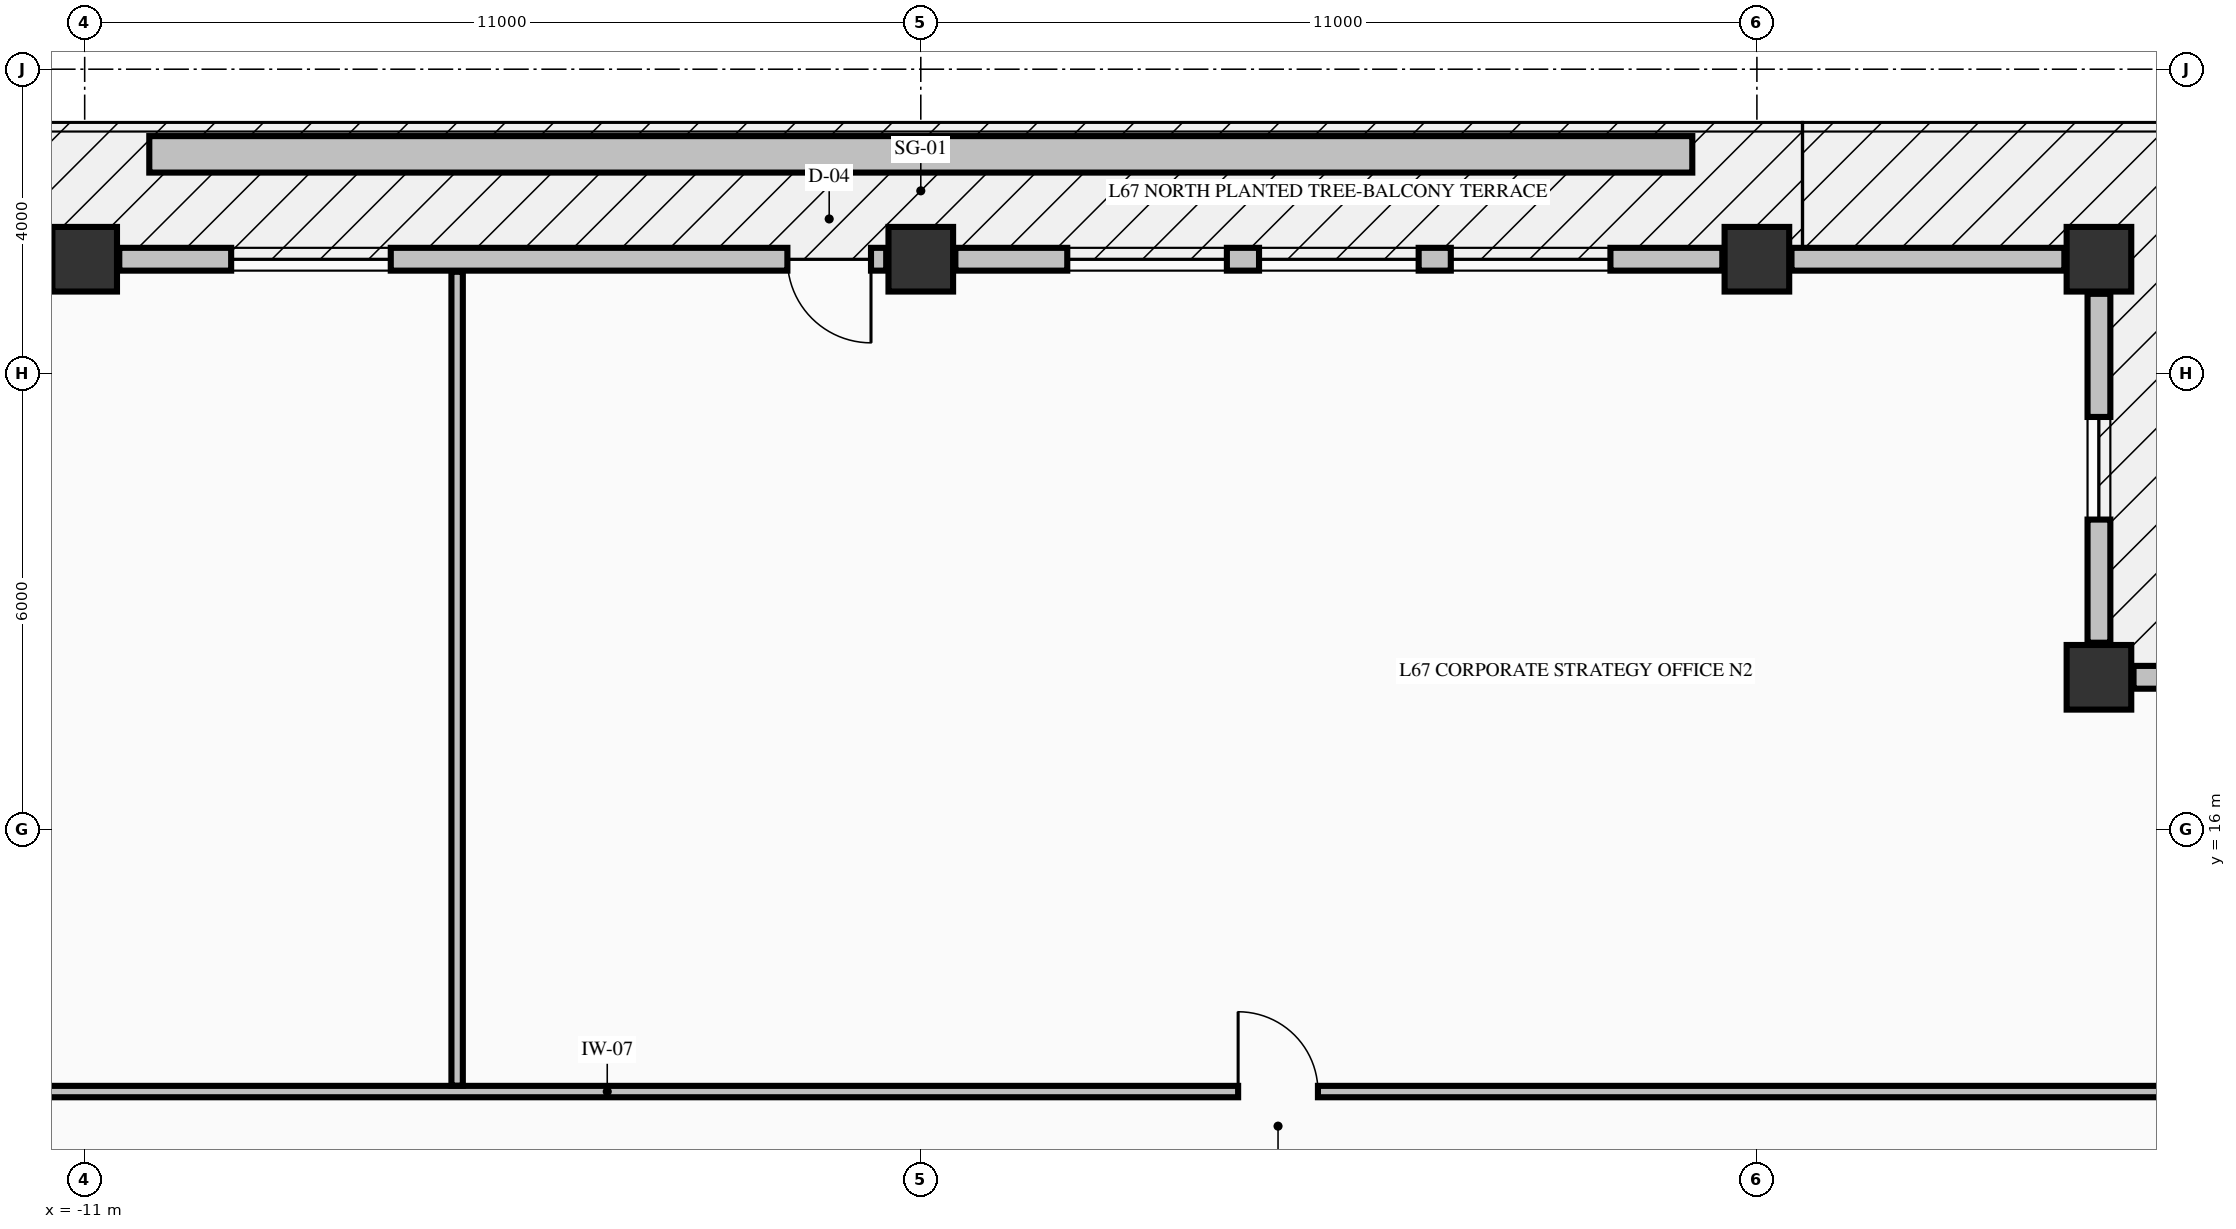
"""IFC4 building model, lengths in metres.
Left out: names, types, materials, properties, quantities, classifications, styles, units other than length and angle.
Written with IfcOpenShell. Run it as: python <this file> out.ifc"""

import sys

from ifc_helpers import new_model, si_unit, direction, frame, frame_2d, origin, origin_2d, place, context, subcontext, project, spatial, rectangle, extrude, element, fill, save


model = new_model("IFC4")
c1 = context("Model", 3, precision=1e-05, world=origin(), true_north=direction((0.0, 1.0)))
c2 = subcontext(c1, "Body", "Model", "MODEL_VIEW")
j1 = project(units=[si_unit("LENGTHUNIT", "METRE"), si_unit("PLANEANGLEUNIT", "RADIAN")], contexts=[c1])
p1 = place(None, origin())
s1 = spatial("IfcSite", under=j1, at=p1, CompositionType="ELEMENT")
p2 = place(p1, origin())
s2 = spatial("IfcBuilding", under=s1, at=p2, CompositionType="ELEMENT")
p3 = place(p2, frame((0.0, 0.0, 254.43)))
s3 = spatial("IfcBuildingStorey", under=s2, at=p3, CompositionType="ELEMENT", Elevation=254.43)
for number, where, z_axis, x_axis in (
    (1, (-11.0, 23.5, -0.425), (0.0, 0.0, 1.0), (1.0, 0.0, 0.0)),
    (2, (0.0, 23.5, -0.425), (0.0, 0.0, 1.0), (1.0, 0.0, 0.0)),
    (3, (11.0, 23.5, -0.425), (0.0, 0.0, 1.0), (1.0, 0.0, 0.0)),
    (4, (15.5, 23.5, -0.425), (0.0, 0.0, 1.0), (1.0, 0.0, 0.0)),
    (5, (15.5, 18.0, -0.425), (0.0, 0.0, 1.0), (1.0, 0.0, 0.0)),
):
    element("IfcColumn", number, at=place(p3, frame(where, z_axis=z_axis, x_axis=x_axis)), inside=s3, PredefinedType="COLUMN", context=c2, shape_type="SweptSolid", body=[
        extrude(rectangle(XDim=0.85, YDim=0.85, at=origin_2d()), origin(), (0.0, 0.0, 1.0), 3.405),
    ])
p4 = place(p3, frame((20.545, 18.0, 0.0), z_axis=(0.0, 0.0, 1.0), x_axis=(-1.0, 0.0, 0.0)))
e6 = element("IfcWall", 6, at=p4, inside=s3, PredefinedType="STANDARD", context=c2, shape_type="SweptSolid", body=[
    extrude(rectangle(XDim=4.59, YDim=0.3, at=frame_2d((2.295, 0.0))), origin(), (0.0, 0.0, 1.0), 2.372),
])
p5 = place(p4, frame((1.62, 0.0, 0.68)))
e7 = element("IfcOpeningElement", 7, at=p5, cuts=e6, PredefinedType="OPENING", context=c2, shape_type="SweptSolid", body=[
    extrude(rectangle(XDim=1.35, YDim=1.42, at=frame_2d((0.675, 0.71))), frame((0.0, 0.16, 0.0), z_axis=(0.0, -1.0, 0.0), x_axis=(1.0, 0.0, 0.0)), (0.0, 0.0, 1.0), 0.32),
])
p6 = place(p3, frame((15.5, 18.455, 0.0), z_axis=(0.0, 0.0, 1.0), x_axis=(0.0, 1.0, 0.0)))
e8 = element("IfcWall", 8, at=p6, inside=s3, PredefinedType="STANDARD", context=c2, shape_type="SweptSolid", body=[
    extrude(rectangle(XDim=4.59, YDim=0.3, at=frame_2d((2.295, 0.0))), origin(), (0.0, 0.0, 1.0), 2.372),
])
p7 = place(p6, frame((1.62, 0.0, 0.68)))
e9 = element("IfcOpeningElement", 9, at=p7, cuts=e8, PredefinedType="OPENING", context=c2, shape_type="SweptSolid", body=[
    extrude(rectangle(XDim=1.35, YDim=1.42, at=frame_2d((0.675, 0.71))), frame((0.0, 0.16, 0.0), z_axis=(0.0, -1.0, 0.0), x_axis=(1.0, 0.0, 0.0)), (0.0, 0.0, 1.0), 0.32),
])
p8 = place(p3, frame((-0.455, 23.5, 0.0), z_axis=(0.0, 0.0, 1.0), x_axis=(-1.0, 0.0, 0.0)))
e10 = element("IfcWall", 10, at=p8, inside=s3, PredefinedType="STANDARD", context=c2, shape_type="SweptSolid", body=[
    extrude(rectangle(XDim=10.09, YDim=0.3, at=frame_2d((5.045, 0.0))), origin(), (0.0, 0.0, 1.0), 2.372),
])
p9 = place(p8, frame((0.2, 0.0, 0.0)))
e11 = element("IfcOpeningElement", 11, at=p9, cuts=e10, PredefinedType="OPENING", context=c2, shape_type="SweptSolid", body=[
    extrude(rectangle(XDim=1.1, YDim=2.15, at=frame_2d((0.55, 1.075))), frame((0.0, 0.16, 0.0), z_axis=(0.0, -1.0, 0.0), x_axis=(1.0, 0.0, 0.0)), (0.0, 0.0, 1.0), 0.32),
])
p10 = place(p8, frame((6.518, 0.0, 0.7)))
e12 = element("IfcOpeningElement", 12, at=p10, cuts=e10, PredefinedType="OPENING", context=c2, shape_type="SweptSolid", body=[
    extrude(rectangle(XDim=2.1, YDim=1.5, at=frame_2d((1.05, 0.75))), frame((0.0, 0.16, 0.0), z_axis=(0.0, -1.0, 0.0), x_axis=(1.0, 0.0, 0.0)), (0.0, 0.0, 1.0), 0.32),
])
p11 = place(p3, frame((10.545, 23.5, 0.0), z_axis=(0.0, 0.0, 1.0), x_axis=(-1.0, 0.0, 0.0)))
e13 = element("IfcWall", 13, at=p11, inside=s3, PredefinedType="STANDARD", context=c2, shape_type="SweptSolid", body=[
    extrude(rectangle(XDim=10.09, YDim=0.3, at=frame_2d((5.045, 0.0))), origin(), (0.0, 0.0, 1.0), 2.372),
])
p12 = place(p11, frame((1.472, 0.0, 0.7)))
e14 = element("IfcOpeningElement", 14, at=p12, cuts=e13, PredefinedType="OPENING", context=c2, shape_type="SweptSolid", body=[
    extrude(rectangle(XDim=2.1, YDim=1.5, at=frame_2d((1.05, 0.75))), frame((0.0, 0.16, 0.0), z_axis=(0.0, -1.0, 0.0), x_axis=(1.0, 0.0, 0.0)), (0.0, 0.0, 1.0), 0.32),
])
p13 = place(p11, frame((3.995, 0.0, 0.7)))
e15 = element("IfcOpeningElement", 15, at=p13, cuts=e13, PredefinedType="OPENING", context=c2, shape_type="SweptSolid", body=[
    extrude(rectangle(XDim=2.1, YDim=1.5, at=frame_2d((1.05, 0.75))), frame((0.0, 0.16, 0.0), z_axis=(0.0, -1.0, 0.0), x_axis=(1.0, 0.0, 0.0)), (0.0, 0.0, 1.0), 0.32),
])
p14 = place(p11, frame((6.518, 0.0, 0.7)))
e16 = element("IfcOpeningElement", 16, at=p14, cuts=e13, PredefinedType="OPENING", context=c2, shape_type="SweptSolid", body=[
    extrude(rectangle(XDim=2.1, YDim=1.5, at=frame_2d((1.05, 0.75))), frame((0.0, 0.16, 0.0), z_axis=(0.0, -1.0, 0.0), x_axis=(1.0, 0.0, 0.0)), (0.0, 0.0, 1.0), 0.32),
])
p15 = place(p3, frame((15.045, 23.5, 0.0), z_axis=(0.0, 0.0, 1.0), x_axis=(-1.0, 0.0, 0.0)))
e17 = element("IfcWall", 17, at=p15, inside=s3, PredefinedType="STANDARD", context=c2, shape_type="SweptSolid", body=[
    extrude(rectangle(XDim=3.59, YDim=0.3, at=frame_2d((1.795, 0.0))), origin(), (0.0, 0.0, 1.0), 2.372),
])
p16 = place(p3, frame((-25.835, 12.55, 0.0), z_axis=(0.0, 0.0, 1.0), x_axis=(1.0, 0.0, 0.0)))
e18 = element("IfcWall", 18, at=p16, inside=s3, PredefinedType="PARTITIONING", context=c2, shape_type="SweptSolid", body=[
    extrude(rectangle(XDim=45.91, YDim=0.15, at=frame_2d((22.955, 0.0))), origin(), (0.0, 0.0, 1.0), 2.98),
])
p17 = place(p16, frame((12.36, 0.0, 0.0)))
e19 = element("IfcOpeningElement", 19, at=p17, cuts=e18, PredefinedType="OPENING", context=c2, shape_type="SweptSolid", body=[
    extrude(rectangle(XDim=1.05, YDim=2.15, at=frame_2d((0.525, 1.075))), frame((0.0, 0.085, 0.0), z_axis=(0.0, -1.0, 0.0), x_axis=(1.0, 0.0, 0.0)), (0.0, 0.0, 1.0), 0.17),
])
p18 = place(p16, frame((30.01, 0.0, 0.0)))
e20 = element("IfcOpeningElement", 20, at=p18, cuts=e18, PredefinedType="OPENING", context=c2, shape_type="SweptSolid", body=[
    extrude(rectangle(XDim=1.05, YDim=2.15, at=frame_2d((0.525, 1.075))), frame((0.0, 0.085, 0.0), z_axis=(0.0, -1.0, 0.0), x_axis=(1.0, 0.0, 0.0)), (0.0, 0.0, 1.0), 0.17),
])
p19 = place(p3, frame((-6.1, 12.628, 0.0), z_axis=(0.0, 0.0, 1.0), x_axis=(0.0, 1.0, 0.0)))
e21 = element("IfcWall", 21, at=p19, inside=s3, PredefinedType="PARTITIONING", context=c2, shape_type="SweptSolid", body=[
    extrude(rectangle(XDim=10.707, YDim=0.15, at=frame_2d((5.354, 0.0))), origin(), (0.0, 0.0, 1.0), 2.98),
])
p20 = place(p3, frame((-10.15, 24.88, -0.04), z_axis=(0.0, 0.0, 1.0), x_axis=(1.0, 0.0, 0.0)))
e22 = element("IfcWall", 22, at=p20, inside=s3, PredefinedType="PARAPET", context=c2, shape_type="SweptSolid", body=[
    extrude(rectangle(XDim=20.3, YDim=0.48, at=frame_2d((10.15, 0.0))), origin(), (0.0, 0.0, 1.0), 0.52),
])
p21 = place(p7, origin())
e23 = element("IfcWindow", 23, at=p21, inside=s3, PartitioningType="SINGLE_PANEL", PredefinedType="WINDOW", context=c2, shape_type="SweptSolid", body=[
    extrude(rectangle(XDim=1.35, YDim=1.42, at=frame_2d((0.675, 0.71))), frame((0.0, 0.03, 0.0), z_axis=(0.0, -1.0, 0.0), x_axis=(1.0, 0.0, 0.0)), (0.0, 0.0, 1.0), 0.06),
])
fill(e9, e23)
p22 = place(p9, origin())
e24 = element("IfcDoor", 24, at=p22, inside=s3, OperationType="SINGLE_SWING_LEFT", PredefinedType="DOOR", context=c2, shape_type="SweptSolid", body=[
    extrude(rectangle(XDim=1.1, YDim=2.15, at=frame_2d((0.55, 1.075))), frame((0.0, 0.025, 0.0), z_axis=(0.0, -1.0, 0.0), x_axis=(1.0, 0.0, 0.0)), (0.0, 0.0, 1.0), 0.05),
])
fill(e11, e24)
p23 = place(p10, origin())
e25 = element("IfcWindow", 25, at=p23, inside=s3, PartitioningType="SINGLE_PANEL", PredefinedType="WINDOW", context=c2, shape_type="SweptSolid", body=[
    extrude(rectangle(XDim=2.1, YDim=1.5, at=frame_2d((1.05, 0.75))), frame((0.0, 0.03, 0.0), z_axis=(0.0, -1.0, 0.0), x_axis=(1.0, 0.0, 0.0)), (0.0, 0.0, 1.0), 0.06),
])
fill(e12, e25)
p24 = place(p12, origin())
e26 = element("IfcWindow", 26, at=p24, inside=s3, PartitioningType="SINGLE_PANEL", PredefinedType="WINDOW", context=c2, shape_type="SweptSolid", body=[
    extrude(rectangle(XDim=2.1, YDim=1.5, at=frame_2d((1.05, 0.75))), frame((0.0, 0.03, 0.0), z_axis=(0.0, -1.0, 0.0), x_axis=(1.0, 0.0, 0.0)), (0.0, 0.0, 1.0), 0.06),
])
fill(e14, e26)
p25 = place(p13, origin())
e27 = element("IfcWindow", 27, at=p25, inside=s3, PartitioningType="SINGLE_PANEL", PredefinedType="WINDOW", context=c2, shape_type="SweptSolid", body=[
    extrude(rectangle(XDim=2.1, YDim=1.5, at=frame_2d((1.05, 0.75))), frame((0.0, 0.03, 0.0), z_axis=(0.0, -1.0, 0.0), x_axis=(1.0, 0.0, 0.0)), (0.0, 0.0, 1.0), 0.06),
])
fill(e15, e27)
p26 = place(p14, origin())
e28 = element("IfcWindow", 28, at=p26, inside=s3, PartitioningType="SINGLE_PANEL", PredefinedType="WINDOW", context=c2, shape_type="SweptSolid", body=[
    extrude(rectangle(XDim=2.1, YDim=1.5, at=frame_2d((1.05, 0.75))), frame((0.0, 0.03, 0.0), z_axis=(0.0, -1.0, 0.0), x_axis=(1.0, 0.0, 0.0)), (0.0, 0.0, 1.0), 0.06),
])
fill(e16, e28)
p27 = place(p18, origin())
e29 = element("IfcDoor", 29, at=p27, inside=s3, OperationType="SINGLE_SWING_LEFT", PredefinedType="DOOR", context=c2, shape_type="SweptSolid", body=[
    extrude(rectangle(XDim=1.05, YDim=2.15, at=frame_2d((0.525, 1.075))), frame((0.0, 0.025, 0.0), z_axis=(0.0, -1.0, 0.0), x_axis=(1.0, 0.0, 0.0)), (0.0, 0.0, 1.0), 0.05),
])
fill(e20, e29)
save(model, sys.argv[1])
